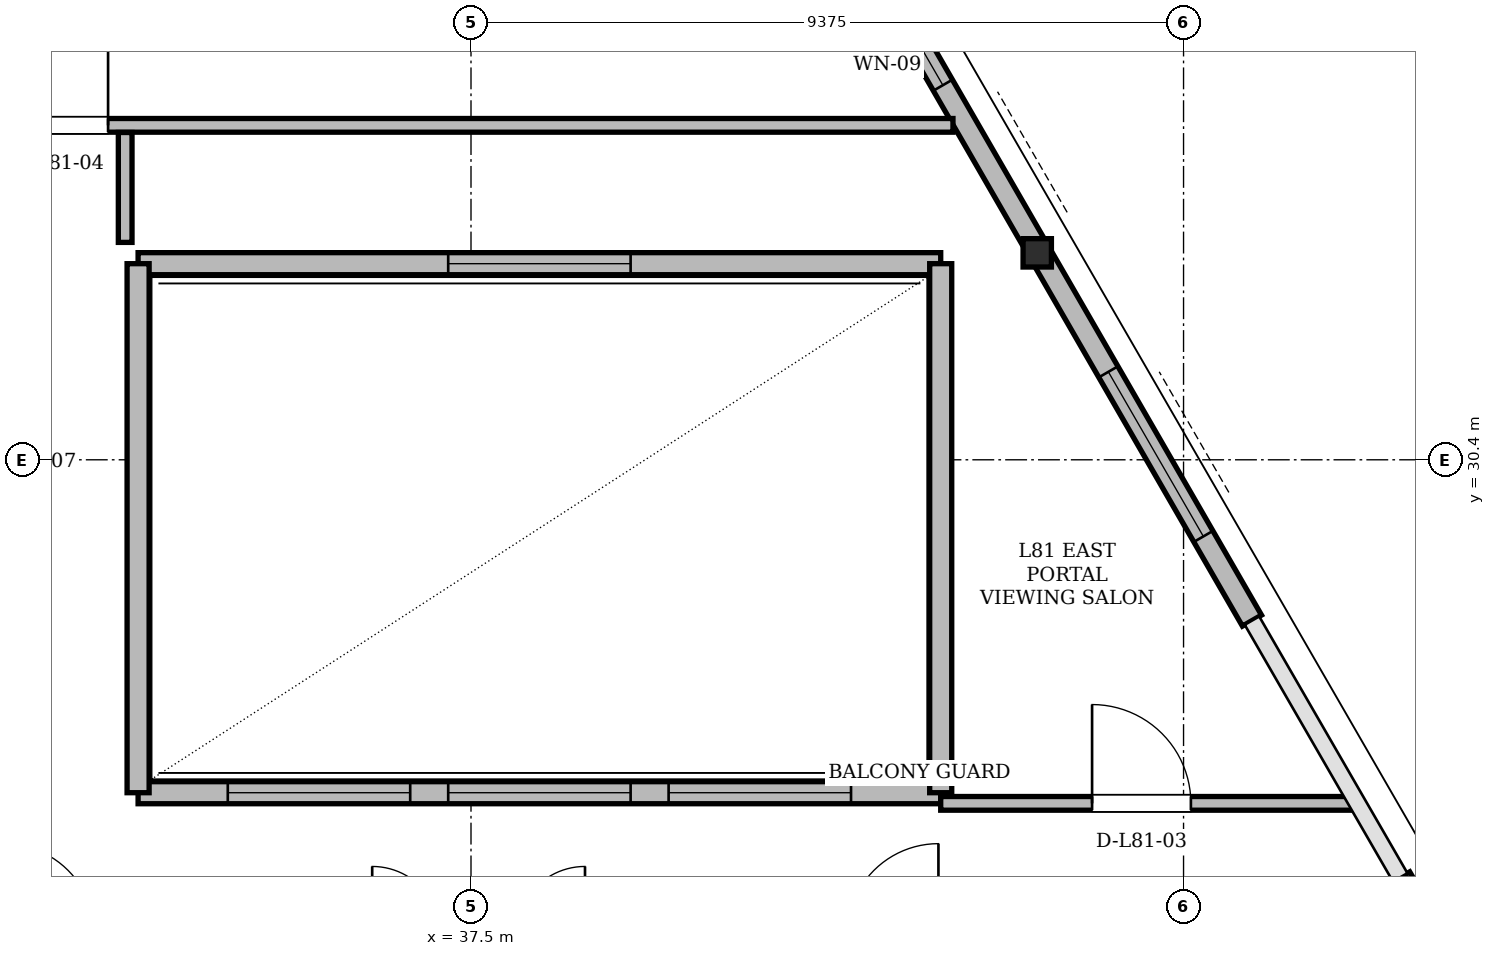
"""IFC4 building model, lengths in metres.
Left out: names, types, materials, properties, quantities, classifications, styles, units other than length and angle.
Written with IfcOpenShell. Run it as: python <this file> out.ifc"""

import sys

from ifc_helpers import new_model, si_unit, direction, frame, frame_2d, origin, origin_2d, place, context, subcontext, project, spatial, rectangle, i_section, extrude, element, fill, save


model = new_model("IFC4")
c1 = context("Model", 3, precision=1e-05, world=origin(), true_north=direction((0.0, 1.0)))
c2 = subcontext(c1, "Body", "Model", "MODEL_VIEW")
j1 = project(units=[si_unit("LENGTHUNIT", "METRE"), si_unit("PLANEANGLEUNIT", "RADIAN")], contexts=[c1])
p1 = place(None, origin())
s1 = spatial("IfcSite", under=j1, at=p1, CompositionType="ELEMENT")
p2 = place(p1, origin())
s2 = spatial("IfcBuilding", under=s1, at=p2, CompositionType="ELEMENT")
p3 = place(p2, frame((0.0, 0.0, 309.6)))
s3 = spatial("IfcBuildingStorey", under=s2, at=p3, CompositionType="ELEMENT", Elevation=309.6)
p4 = place(p3, frame((44.976, 33.133, 0.004), z_axis=(-0.011578339456, -0.0045117473, 0.999922790115), x_axis=(0.363079476092, -0.931758173584, 0.0)))
e1 = element("IfcColumn", 1, at=p4, inside=s3, PredefinedType="COLUMN", context=c2, shape_type="SweptSolid", body=[
    extrude(i_section(OverallWidth=0.373, OverallDepth=0.373, WebThickness=0.016, FlangeThickness=0.026, at=origin_2d()), origin(), (0.0, 0.0, 1.0), 4.491),
])
p5 = place(p3, frame((58.186, 10.252, 0.0), z_axis=(0.0, 0.0, 1.0), x_axis=(-0.500001379048, 0.866024607589, 0.0)))
e2 = element("IfcWall", 2, at=p5, inside=s3, PredefinedType="SOLIDWALL", context=c2, shape_type="SweptSolid", body=[
    extrude(rectangle(XDim=16.921, YDim=0.29, at=frame_2d((8.461, 0.0))), origin(), (0.0, 0.0, 1.0), 3.618),
])
p6 = place(p5, frame((2.222, 0.0, 0.85)))
e3 = element("IfcOpeningElement", 3, at=p6, cuts=e2, PredefinedType="OPENING", context=c2, shape_type="SweptSolid", body=[
    extrude(rectangle(XDim=3.0, YDim=2.25, at=frame_2d((1.5, 1.125))), frame((0.0, 0.145, 0.0), z_axis=(0.0, -1.0, 0.0), x_axis=(1.0, 0.0, 0.0)), (0.0, 0.0, 1.0), 0.29),
])
p7 = place(p5, frame((7.788, 0.0, 0.85)))
e4 = element("IfcOpeningElement", 4, at=p7, cuts=e2, PredefinedType="OPENING", context=c2, shape_type="SweptSolid", body=[
    extrude(rectangle(XDim=2.6, YDim=1.95, at=frame_2d((1.3, 0.975))), frame((0.0, 0.145, 0.0), z_axis=(0.0, -1.0, 0.0), x_axis=(1.0, 0.0, 0.0)), (0.0, 0.0, 1.0), 0.29),
])
p8 = place(p3, frame((47.775, 28.284, 0.0), z_axis=(0.0, 0.0, 1.0), x_axis=(-0.500005952404, 0.866021967135, 0.0)))
e5 = element("IfcWall", 5, at=p8, inside=s3, PredefinedType="SOLIDWALL", context=c2, shape_type="SweptSolid", body=[
    extrude(rectangle(XDim=16.922, YDim=0.29, at=frame_2d((8.461, 0.0))), origin(), (0.0, 0.0, 1.0), 3.618),
])
p9 = place(p8, frame((1.279, 0.0, 0.85)))
e6 = element("IfcOpeningElement", 6, at=p9, cuts=e5, PredefinedType="OPENING", context=c2, shape_type="SweptSolid", body=[
    extrude(rectangle(XDim=2.5, YDim=2.15, at=frame_2d((1.25, 1.075))), frame((0.0, 0.145, 0.0), z_axis=(0.0, -1.0, 0.0), x_axis=(1.0, 0.0, 0.0)), (0.0, 0.0, 1.0), 0.29),
])
p10 = place(p8, frame((8.134, 0.0, 0.85)))
e7 = element("IfcOpeningElement", 7, at=p10, cuts=e5, PredefinedType="OPENING", context=c2, shape_type="SweptSolid", body=[
    extrude(rectangle(XDim=1.2, YDim=1.48, at=frame_2d((0.6, 0.74))), frame((0.0, 0.145, 0.0), z_axis=(0.0, -1.0, 0.0), x_axis=(1.0, 0.0, 0.0)), (0.0, 0.0, 1.0), 0.29),
])
p11 = place(p8, frame((12.926, 0.0, 0.85)))
e8 = element("IfcOpeningElement", 8, at=p11, cuts=e5, PredefinedType="OPENING", context=c2, shape_type="SweptSolid", body=[
    extrude(rectangle(XDim=2.2, YDim=1.85, at=frame_2d((1.1, 0.925))), frame((0.0, 0.145, 0.0), z_axis=(0.0, -1.0, 0.0), x_axis=(1.0, 0.0, 0.0)), (0.0, 0.0, 1.0), 0.29),
])
p12 = place(p3, frame((35.686, 42.939, 0.0), z_axis=(0.0, 0.0, 1.0), x_axis=(-0.500005952404, -0.866021967135, 0.0)))
e9 = element("IfcWall", 9, at=p12, inside=s3, PredefinedType="SOLIDWALL", context=c2, shape_type="SweptSolid", body=[
    extrude(rectangle(XDim=16.922, YDim=0.29, at=frame_2d((8.461, 0.0))), origin(), (0.0, 0.0, 1.0), 3.618),
])
p13 = place(p12, frame((13.149, 0.0, 0.85)))
e10 = element("IfcOpeningElement", 10, at=p13, cuts=e9, PredefinedType="OPENING", context=c2, shape_type="SweptSolid", body=[
    extrude(rectangle(XDim=2.6, YDim=1.95, at=frame_2d((1.3, 0.975))), frame((0.0, 0.145, 0.0), z_axis=(0.0, -1.0, 0.0), x_axis=(1.0, 0.0, 0.0)), (0.0, 0.0, 1.0), 0.29),
])
p14 = place(p12, frame((1.682, 0.0, 0.85)))
e11 = element("IfcOpeningElement", 11, at=p14, cuts=e9, PredefinedType="OPENING", context=c2, shape_type="SweptSolid", body=[
    extrude(rectangle(XDim=2.4, YDim=1.9, at=frame_2d((1.2, 0.95))), frame((0.0, 0.145, 0.0), z_axis=(0.0, -1.0, 0.0), x_axis=(1.0, 0.0, 0.0)), (0.0, 0.0, 1.0), 0.29),
])
p15 = place(p12, frame((7.545, 0.0, 0.85)))
e12 = element("IfcOpeningElement", 12, at=p15, cuts=e9, PredefinedType="OPENING", context=c2, shape_type="SweptSolid", body=[
    extrude(rectangle(XDim=1.2, YDim=1.48, at=frame_2d((0.6, 0.74))), frame((0.0, 0.145, 0.0), z_axis=(0.0, -1.0, 0.0), x_axis=(1.0, 0.0, 0.0)), (0.0, 0.0, 1.0), 0.29),
])
p16 = place(p3, frame((33.12, 26.02, 0.0), z_axis=(0.0, 0.0, 1.0), x_axis=(1.0, 0.0, 0.0)))
e13 = element("IfcWall", 13, at=p16, inside=s3, PredefinedType="SOLIDWALL", context=c2, shape_type="SweptSolid", body=[
    extrude(rectangle(XDim=10.56, YDim=0.29, at=frame_2d((5.28, 0.0))), origin(), (0.0, 0.0, 1.0), 4.24),
])
p17 = place(p16, frame((1.18, 0.0, 0.9)))
e14 = element("IfcOpeningElement", 14, at=p17, cuts=e13, PredefinedType="OPENING", context=c2, shape_type="SweptSolid", body=[
    extrude(rectangle(XDim=2.4, YDim=1.9, at=frame_2d((1.2, 0.95))), frame((0.0, 0.145, 0.0), z_axis=(0.0, -1.0, 0.0), x_axis=(1.0, 0.0, 0.0)), (0.0, 0.0, 1.0), 0.29),
])
p18 = place(p16, frame((4.08, 0.0, 0.9)))
e15 = element("IfcOpeningElement", 15, at=p18, cuts=e13, PredefinedType="OPENING", context=c2, shape_type="SweptSolid", body=[
    extrude(rectangle(XDim=2.4, YDim=1.9, at=frame_2d((1.2, 0.95))), frame((0.0, 0.145, 0.0), z_axis=(0.0, -1.0, 0.0), x_axis=(1.0, 0.0, 0.0)), (0.0, 0.0, 1.0), 0.29),
])
p19 = place(p16, frame((6.98, 0.0, 0.9)))
e16 = element("IfcOpeningElement", 16, at=p19, cuts=e13, PredefinedType="OPENING", context=c2, shape_type="SweptSolid", body=[
    extrude(rectangle(XDim=2.4, YDim=1.9, at=frame_2d((1.2, 0.95))), frame((0.0, 0.145, 0.0), z_axis=(0.0, -1.0, 0.0), x_axis=(1.0, 0.0, 0.0)), (0.0, 0.0, 1.0), 0.29),
])
p20 = place(p3, frame((33.12, 32.98, 0.0), z_axis=(0.0, 0.0, 1.0), x_axis=(1.0, 0.0, 0.0)))
e17 = element("IfcWall", 17, at=p20, inside=s3, PredefinedType="SOLIDWALL", context=c2, shape_type="SweptSolid", body=[
    extrude(rectangle(XDim=10.56, YDim=0.29, at=frame_2d((5.28, 0.0))), origin(), (0.0, 0.0, 1.0), 3.826),
])
p21 = place(p20, frame((4.08, 0.0, 0.9)))
e18 = element("IfcOpeningElement", 18, at=p21, cuts=e17, PredefinedType="OPENING", context=c2, shape_type="SweptSolid", body=[
    extrude(rectangle(XDim=2.4, YDim=1.9, at=frame_2d((1.2, 0.95))), frame((0.0, 0.145, 0.0), z_axis=(0.0, -1.0, 0.0), x_axis=(1.0, 0.0, 0.0)), (0.0, 0.0, 1.0), 0.29),
])
p22 = place(p3, frame((33.12, 26.02, 0.0), z_axis=(0.0, 0.0, 1.0), x_axis=(0.0, 1.0, 0.0)))
e19 = element("IfcWall", 19, at=p22, inside=s3, PredefinedType="SOLIDWALL", context=c2, shape_type="SweptSolid", body=[
    extrude(rectangle(XDim=6.96, YDim=0.29, at=frame_2d((3.48, 0.0))), origin(), (0.0, 0.0, 1.0), 4.24),
])
p23 = place(p3, frame((43.68, 26.02, 0.0), z_axis=(0.0, 0.0, 1.0), x_axis=(0.0, 1.0, 0.0)))
e20 = element("IfcWall", 20, at=p23, inside=s3, PredefinedType="SOLIDWALL", context=c2, shape_type="SweptSolid", body=[
    extrude(rectangle(XDim=6.96, YDim=0.29, at=frame_2d((3.48, 0.0))), origin(), (0.0, 0.0, 1.0), 3.826),
])
p24 = place(p3, frame((43.68, 25.88, 0.0), z_axis=(0.0, 0.0, 1.0), x_axis=(1.0, 0.0, 0.0)))
e21 = element("IfcWall", 21, at=p24, inside=s3, PredefinedType="PARTITIONING", context=c2, shape_type="SweptSolid", body=[
    extrude(rectangle(XDim=5.42, YDim=0.18, at=frame_2d((2.71, 0.0))), origin(), (0.0, 0.0, 1.0), 3.618),
])
p25 = place(p24, frame((1.992, 0.0, 0.0)))
e22 = element("IfcOpeningElement", 22, at=p25, cuts=e21, PredefinedType="OPENING", context=c2, shape_type="SweptSolid", body=[
    extrude(rectangle(XDim=1.3, YDim=2.2, at=frame_2d((0.65, 1.1))), frame((0.0, 0.09, 0.0), z_axis=(0.0, -1.0, 0.0), x_axis=(1.0, 0.0, 0.0)), (0.0, 0.0, 1.0), 0.18),
])
p26 = place(p3, frame((31.2, 34.8, 0.0), z_axis=(0.0, 0.0, 1.0), x_axis=(1.0, 0.0, 0.0)))
e23 = element("IfcWall", 23, at=p26, inside=s3, PredefinedType="PARTITIONING", context=c2, shape_type="SweptSolid", body=[
    extrude(rectangle(XDim=12.641, YDim=0.18, at=frame_2d((6.321, 0.0))), origin(), (0.0, 0.0, 1.0), 3.826),
])
p27 = place(p26, frame((0.225, 0.0, 0.0)))
e24 = element("IfcOpeningElement", 24, at=p27, cuts=e23, PredefinedType="OPENING", context=c2, shape_type="SweptSolid", body=[
    extrude(rectangle(XDim=1.3, YDim=2.2, at=frame_2d((0.65, 1.1))), frame((0.0, 0.09, 0.0), z_axis=(0.0, -1.0, 0.0), x_axis=(1.0, 0.0, 0.0)), (0.0, 0.0, 1.0), 0.18),
])
p28 = place(p3, frame((32.95, 33.26, 0.0), z_axis=(0.0, 0.0, 1.0), x_axis=(0.0, 1.0, 0.0)))
e25 = element("IfcWall", 25, at=p28, inside=s3, PredefinedType="PARTITIONING", context=c2, shape_type="SweptSolid", body=[
    extrude(rectangle(XDim=1.446, YDim=0.18, at=frame_2d((0.723, 0.0))), origin(), (0.0, 0.0, 1.0), 3.826),
])
p29 = place(p9, origin())
e26 = element("IfcWindow", 26, at=p29, inside=s3, PartitioningType="SINGLE_PANEL", PredefinedType="WINDOW", context=c2, shape_type="SweptSolid", body=[
    extrude(rectangle(XDim=2.5, YDim=2.15, at=frame_2d((1.25, 1.075))), frame((0.0, 0.03, 0.0), z_axis=(0.0, -1.0, 0.0), x_axis=(1.0, 0.0, 0.0)), (0.0, 0.0, 1.0), 0.06),
])
fill(e6, e26)
p30 = place(p10, origin())
e27 = element("IfcWindow", 27, at=p30, inside=s3, PartitioningType="SINGLE_PANEL", PredefinedType="WINDOW", context=c2, shape_type="SweptSolid", body=[
    extrude(rectangle(XDim=1.2, YDim=1.48, at=frame_2d((0.6, 0.74))), frame((0.0, 0.03, 0.0), z_axis=(0.0, -1.0, 0.0), x_axis=(1.0, 0.0, 0.0)), (0.0, 0.0, 1.0), 0.06),
])
fill(e7, e27)
p31 = place(p17, origin())
e28 = element("IfcWindow", 28, at=p31, inside=s3, PartitioningType="SINGLE_PANEL", PredefinedType="WINDOW", context=c2, shape_type="SweptSolid", body=[
    extrude(rectangle(XDim=2.4, YDim=1.9, at=frame_2d((1.2, 0.95))), frame((0.0, 0.03, 0.0), z_axis=(0.0, -1.0, 0.0), x_axis=(1.0, 0.0, 0.0)), (0.0, 0.0, 1.0), 0.06),
])
fill(e14, e28)
p32 = place(p18, origin())
e29 = element("IfcWindow", 29, at=p32, inside=s3, PartitioningType="SINGLE_PANEL", PredefinedType="WINDOW", context=c2, shape_type="SweptSolid", body=[
    extrude(rectangle(XDim=2.4, YDim=1.9, at=frame_2d((1.2, 0.95))), frame((0.0, 0.03, 0.0), z_axis=(0.0, -1.0, 0.0), x_axis=(1.0, 0.0, 0.0)), (0.0, 0.0, 1.0), 0.06),
])
fill(e15, e29)
p33 = place(p19, origin())
e30 = element("IfcWindow", 30, at=p33, inside=s3, PartitioningType="SINGLE_PANEL", PredefinedType="WINDOW", context=c2, shape_type="SweptSolid", body=[
    extrude(rectangle(XDim=2.4, YDim=1.9, at=frame_2d((1.2, 0.95))), frame((0.0, 0.03, 0.0), z_axis=(0.0, -1.0, 0.0), x_axis=(1.0, 0.0, 0.0)), (0.0, 0.0, 1.0), 0.06),
])
fill(e16, e30)
p34 = place(p21, origin())
e31 = element("IfcWindow", 31, at=p34, inside=s3, PartitioningType="SINGLE_PANEL", PredefinedType="WINDOW", context=c2, shape_type="SweptSolid", body=[
    extrude(rectangle(XDim=2.4, YDim=1.9, at=frame_2d((1.2, 0.95))), frame((0.0, 0.03, 0.0), z_axis=(0.0, -1.0, 0.0), x_axis=(1.0, 0.0, 0.0)), (0.0, 0.0, 1.0), 0.06),
])
fill(e18, e31)
p35 = place(p25, origin())
e32 = element("IfcDoor", 32, at=p35, inside=s3, OperationType="SINGLE_SWING_LEFT", PredefinedType="DOOR", context=c2, shape_type="SweptSolid", body=[
    extrude(rectangle(XDim=1.3, YDim=2.2, at=frame_2d((0.65, 1.1))), frame((0.0, 0.025, 0.0), z_axis=(0.0, -1.0, 0.0), x_axis=(1.0, 0.0, 0.0)), (0.0, 0.0, 1.0), 0.05),
])
fill(e22, e32)
p36 = place(p27, origin())
e33 = element("IfcDoor", 33, at=p36, inside=s3, OperationType="SINGLE_SWING_RIGHT", PredefinedType="DOOR", context=c2, shape_type="SweptSolid", body=[
    extrude(rectangle(XDim=1.3, YDim=2.2, at=frame_2d((0.65, 1.1))), frame((0.0, 0.025, 0.0), z_axis=(0.0, -1.0, 0.0), x_axis=(1.0, 0.0, 0.0)), (0.0, 0.0, 1.0), 0.05),
])
fill(e24, e33)
save(model, sys.argv[1])
